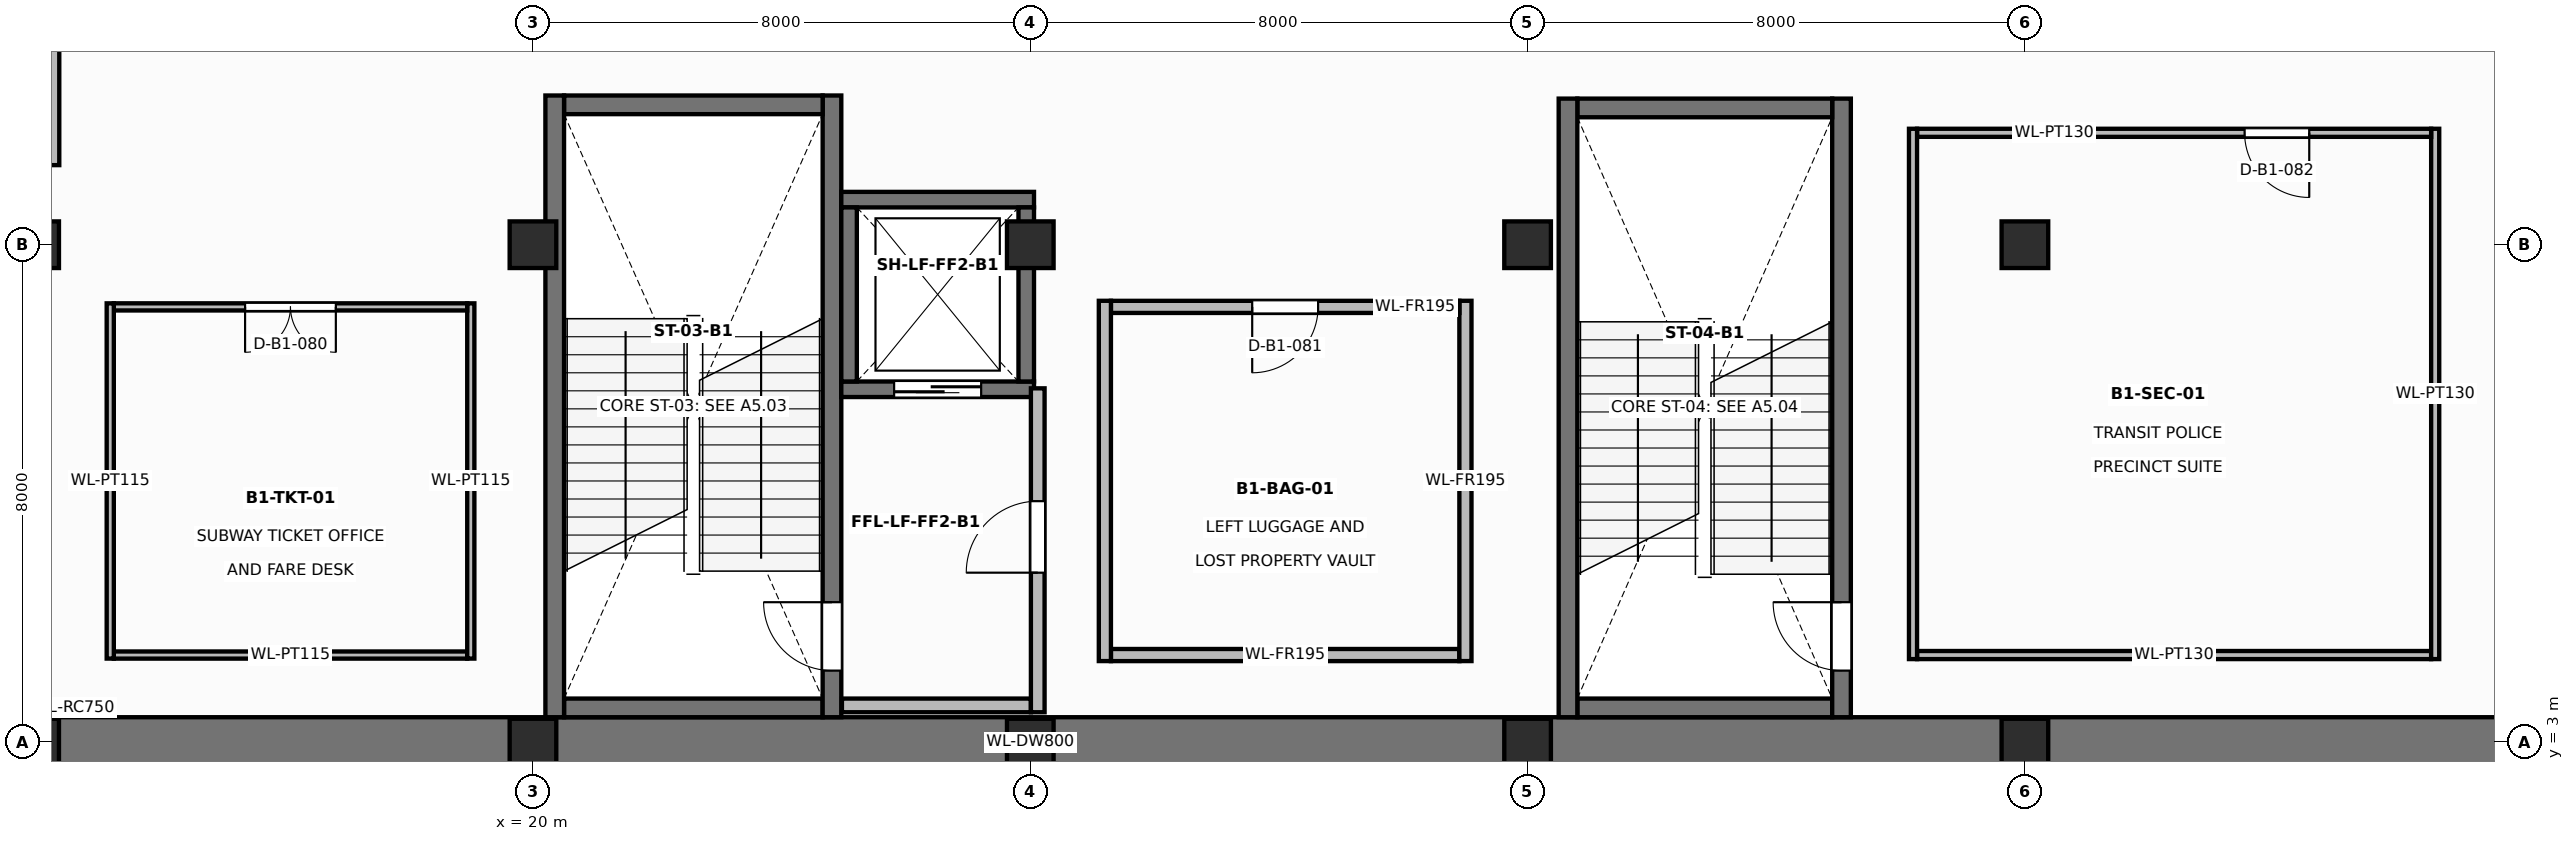
"""IFC4 building model, lengths in metres.
Left out: names, types, materials, properties, quantities, classifications, styles, units other than length and angle.
Written with IfcOpenShell. Run it as: python <this file> out.ifc"""

import sys

from ifc_helpers import new_model, si_unit, direction, frame, frame_2d, origin, origin_2d, place, context, subcontext, project, spatial, rectangle, extrude, element, fill, save


model = new_model("IFC4")
c1 = context("Model", 3, precision=1e-05, world=origin(), true_north=direction((0.0, 1.0)))
c2 = subcontext(c1, "Body", "Model", "MODEL_VIEW")
j1 = project(units=[si_unit("LENGTHUNIT", "METRE"), si_unit("PLANEANGLEUNIT", "RADIAN")], contexts=[c1])
p1 = place(None, origin())
s1 = spatial("IfcSite", under=j1, at=p1, CompositionType="ELEMENT")
p2 = place(p1, origin())
s2 = spatial("IfcBuilding", under=s1, at=p2, CompositionType="ELEMENT")
p3 = place(p2, frame((0.0, 0.0, -5.6)))
s3 = spatial("IfcBuildingStorey", under=s2, at=p3, CompositionType="ELEMENT", Elevation=-5.6)
p4 = place(p3, frame((4.4, 3.0, 0.0), z_axis=(0.0, 0.0, 1.0), x_axis=(1.0, 0.0, 0.0)))
e1 = element("IfcWall", 1, at=p4, inside=s3, PredefinedType="SOLIDWALL", context=c2, shape_type="SweptSolid", body=[
    extrude(rectangle(XDim=47.2, YDim=0.8, at=frame_2d((23.6, 0.0))), origin(), (0.0, 0.0, 1.0), 5.18),
])
for number, where, z_axis, x_axis in (
    (2, (12.0, 3.0, 0.0), (0.0, 0.0, 1.0), (1.0, 0.0, 0.0)),
    (3, (12.0, 11.0, 0.0), (0.0, 0.0, 1.0), (1.0, 0.0, 0.0)),
    (4, (20.0, 3.0, 0.0), (0.0, 0.0, 1.0), (1.0, 0.0, 0.0)),
    (5, (20.0, 11.0, 0.0), (0.0, 0.0, 1.0), (1.0, 0.0, 0.0)),
    (6, (28.0, 3.0, 0.0), (0.0, 0.0, 1.0), (1.0, 0.0, 0.0)),
    (7, (28.0, 11.0, 0.0), (0.0, 0.0, 1.0), (1.0, 0.0, 0.0)),
    (8, (36.0, 3.0, 0.0), (0.0, 0.0, 1.0), (1.0, 0.0, 0.0)),
    (9, (36.0, 11.0, 0.0), (0.0, 0.0, 1.0), (1.0, 0.0, 0.0)),
    (10, (44.0, 3.0, 0.0), (0.0, 0.0, 1.0), (1.0, 0.0, 0.0)),
    (11, (44.0, 11.0, 0.0), (0.0, 0.0, 1.0), (1.0, 0.0, 0.0)),
):
    element("IfcColumn", number, at=place(p3, frame(where, z_axis=z_axis, x_axis=x_axis)), inside=s3, PredefinedType="COLUMN", context=c2, shape_type="SweptSolid", body=[
        extrude(rectangle(XDim=0.75, YDim=0.75, at=origin_2d()), origin(), (0.0, 0.0, 1.0), 5.6),
    ])
p5 = place(p3, frame((20.5, 3.55, 0.0), z_axis=(0.0, 0.0, 1.0), x_axis=(1.0, 0.0, 0.0)))
e12 = element("IfcWall", 12, at=p5, inside=s3, PredefinedType="SHEAR", context=c2, shape_type="SweptSolid", body=[
    extrude(rectangle(XDim=4.16, YDim=0.3, at=frame_2d((2.08, 0.0))), origin(), (0.0, 0.0, 1.0), 5.275),
])
p6 = place(p3, frame((24.81, 3.4, 0.0), z_axis=(0.0, 0.0, 1.0), x_axis=(0.0, 1.0, 0.0)))
e13 = element("IfcWall", 13, at=p6, inside=s3, PredefinedType="SHEAR", context=c2, shape_type="SweptSolid", body=[
    extrude(rectangle(XDim=10.0, YDim=0.3, at=frame_2d((5.0, 0.0))), origin(), (0.0, 0.0, 1.0), 5.275),
])
p7 = place(p6, frame((0.75, 0.0, 0.0)))
e14 = element("IfcOpeningElement", 14, at=p7, cuts=e13, PredefinedType="OPENING", context=c2, shape_type="SweptSolid", body=[
    extrude(rectangle(XDim=1.1, YDim=2.15, at=frame_2d((0.55, 1.075))), frame((0.0, 0.16, 0.0), z_axis=(0.0, -1.0, 0.0), x_axis=(1.0, 0.0, 0.0)), (0.0, 0.0, 1.0), 0.32),
])
p8 = place(p3, frame((24.66, 13.25, 0.0), z_axis=(0.0, 0.0, 1.0), x_axis=(-1.0, 0.0, 0.0)))
e15 = element("IfcWall", 15, at=p8, inside=s3, PredefinedType="SHEAR", context=c2, shape_type="SweptSolid", body=[
    extrude(rectangle(XDim=4.16, YDim=0.3, at=frame_2d((2.08, 0.0))), origin(), (0.0, 0.0, 1.0), 5.275),
])
p9 = place(p3, frame((20.35, 13.4, 0.0), z_axis=(0.0, 0.0, 1.0), x_axis=(0.0, -1.0, 0.0)))
e16 = element("IfcWall", 16, at=p9, inside=s3, PredefinedType="SHEAR", context=c2, shape_type="SweptSolid", body=[
    extrude(rectangle(XDim=10.0, YDim=0.3, at=frame_2d((5.0, 0.0))), origin(), (0.0, 0.0, 1.0), 5.275),
])
p10 = place(p3, frame((36.8, 3.55, 0.0), z_axis=(0.0, 0.0, 1.0), x_axis=(1.0, 0.0, 0.0)))
e17 = element("IfcWall", 17, at=p10, inside=s3, PredefinedType="SHEAR", context=c2, shape_type="SweptSolid", body=[
    extrude(rectangle(XDim=4.1, YDim=0.3, at=frame_2d((2.05, 0.0))), origin(), (0.0, 0.0, 1.0), 5.275),
])
p11 = place(p3, frame((41.05, 3.4, 0.0), z_axis=(0.0, 0.0, 1.0), x_axis=(0.0, 1.0, 0.0)))
e18 = element("IfcWall", 18, at=p11, inside=s3, PredefinedType="SHEAR", context=c2, shape_type="SweptSolid", body=[
    extrude(rectangle(XDim=9.95, YDim=0.3, at=frame_2d((4.975, 0.0))), origin(), (0.0, 0.0, 1.0), 5.275),
])
p12 = place(p11, frame((0.75, 0.0, 0.0)))
e19 = element("IfcOpeningElement", 19, at=p12, cuts=e18, PredefinedType="OPENING", context=c2, shape_type="SweptSolid", body=[
    extrude(rectangle(XDim=1.1, YDim=2.15, at=frame_2d((0.55, 1.075))), frame((0.0, 0.16, 0.0), z_axis=(0.0, -1.0, 0.0), x_axis=(1.0, 0.0, 0.0)), (0.0, 0.0, 1.0), 0.32),
])
p13 = place(p3, frame((40.9, 13.2, 0.0), z_axis=(0.0, 0.0, 1.0), x_axis=(-1.0, 0.0, 0.0)))
e20 = element("IfcWall", 20, at=p13, inside=s3, PredefinedType="SHEAR", context=c2, shape_type="SweptSolid", body=[
    extrude(rectangle(XDim=4.1, YDim=0.3, at=frame_2d((2.05, 0.0))), origin(), (0.0, 0.0, 1.0), 5.275),
])
p14 = place(p3, frame((36.65, 13.35, 0.0), z_axis=(0.0, 0.0, 1.0), x_axis=(0.0, -1.0, 0.0)))
e21 = element("IfcWall", 21, at=p14, inside=s3, PredefinedType="SHEAR", context=c2, shape_type="SweptSolid", body=[
    extrude(rectangle(XDim=9.95, YDim=0.3, at=frame_2d((4.975, 0.0))), origin(), (0.0, 0.0, 1.0), 5.275),
])
p15 = place(p3, frame((12.27, 12.28, 0.0), z_axis=(0.0, 0.0, 1.0), x_axis=(0.0, 1.0, 0.0)))
e22 = element("IfcWall", 22, at=p15, inside=s3, PredefinedType="SOLIDWALL", context=c2, shape_type="SweptSolid", body=[
    extrude(rectangle(XDim=5.21, YDim=0.22, at=frame_2d((2.605, 0.0))), origin(), (0.0, 0.0, 1.0), 4.475),
])
p16 = place(p3, frame((24.96, 8.675, 0.0), z_axis=(0.0, 0.0, 1.0), x_axis=(1.0, 0.0, 0.0)))
e23 = element("IfcWall", 23, at=p16, inside=s3, PredefinedType="SOLIDWALL", context=c2, shape_type="SweptSolid", body=[
    extrude(rectangle(XDim=3.1, YDim=0.25, at=frame_2d((1.55, 0.0))), origin(), (0.0, 0.0, 1.0), 5.275),
])
p17 = place(p16, frame((0.85, 0.0, 0.0)))
e24 = element("IfcOpeningElement", 24, at=p17, cuts=e23, PredefinedType="OPENING", context=c2, shape_type="SweptSolid", body=[
    extrude(rectangle(XDim=1.4, YDim=2.25, at=frame_2d((0.7, 1.125))), frame((0.0, 0.135, 0.0), z_axis=(0.0, -1.0, 0.0), x_axis=(1.0, 0.0, 0.0)), (0.0, 0.0, 1.0), 0.27),
])
p18 = place(p3, frame((28.06, 11.725, 0.0), z_axis=(0.0, 0.0, 1.0), x_axis=(-1.0, 0.0, 0.0)))
e25 = element("IfcWall", 25, at=p18, inside=s3, PredefinedType="SOLIDWALL", context=c2, shape_type="SweptSolid", body=[
    extrude(rectangle(XDim=3.1, YDim=0.25, at=frame_2d((1.55, 0.0))), origin(), (0.0, 0.0, 1.0), 5.275),
])
for number, where, z_axis, x_axis in (
    (26, (27.935, 8.8, 0.0), (0.0, 0.0, 1.0), (0.0, 1.0, 0.0)),
    (27, (25.085, 11.6, 0.0), (0.0, 0.0, 1.0), (0.0, -1.0, 0.0)),
):
    element("IfcWall", number, at=place(p3, frame(where, z_axis=z_axis, x_axis=x_axis)), inside=s3, PredefinedType="SOLIDWALL", context=c2, shape_type="SweptSolid", body=[
        extrude(rectangle(XDim=2.8, YDim=0.25, at=frame_2d((1.4, 0.0))), origin(), (0.0, 0.0, 1.0), 5.275),
    ])
p19 = place(p3, frame((24.97, 3.59, 0.0), z_axis=(0.0, 0.0, 1.0), x_axis=(1.0, 0.0, 0.0)))
e28 = element("IfcWall", 28, at=p19, inside=s3, PredefinedType="SOLIDWALL", context=c2, shape_type="SweptSolid", body=[
    extrude(rectangle(XDim=3.04, YDim=0.22, at=frame_2d((1.52, 0.0))), origin(), (0.0, 0.0, 1.0), 4.475),
])
p20 = place(p3, frame((28.12, 3.48, 0.0), z_axis=(0.0, 0.0, 1.0), x_axis=(0.0, 1.0, 0.0)))
e29 = element("IfcWall", 29, at=p20, inside=s3, PredefinedType="SOLIDWALL", context=c2, shape_type="SweptSolid", body=[
    extrude(rectangle(XDim=5.21, YDim=0.22, at=frame_2d((2.605, 0.0))), origin(), (0.0, 0.0, 1.0), 4.475),
])
p21 = place(p20, frame((2.245, 0.0, 0.0)))
e30 = element("IfcOpeningElement", 30, at=p21, cuts=e29, PredefinedType="OPENING", context=c2, shape_type="SweptSolid", body=[
    extrude(rectangle(XDim=1.15, YDim=2.15, at=frame_2d((0.575, 1.075))), frame((0.0, 0.12, 0.0), z_axis=(0.0, -1.0, 0.0), x_axis=(1.0, 0.0, 0.0)), (0.0, 0.0, 1.0), 0.24),
])
p22 = place(p3, frame((13.257, 4.4, 0.0), z_axis=(0.0, 0.0, 1.0), x_axis=(1.0, 0.0, 0.0)))
e31 = element("IfcWall", 31, at=p22, inside=s3, PredefinedType="PARTITIONING", context=c2, shape_type="SweptSolid", body=[
    extrude(rectangle(XDim=5.685, YDim=0.115, at=frame_2d((2.842, 0.0))), origin(), (0.0, 0.0, 1.0), 5.18),
])
p23 = place(p3, frame((19.0, 4.343, 0.0), z_axis=(0.0, 0.0, 1.0), x_axis=(0.0, 1.0, 0.0)))
e32 = element("IfcWall", 32, at=p23, inside=s3, PredefinedType="PARTITIONING", context=c2, shape_type="SweptSolid", body=[
    extrude(rectangle(XDim=5.714, YDim=0.115, at=frame_2d((2.857, 0.0))), origin(), (0.0, 0.0, 1.0), 4.625),
])
p24 = place(p3, frame((18.942, 10.0, 0.0), z_axis=(0.0, 0.0, 1.0), x_axis=(-1.0, 0.0, 0.0)))
e33 = element("IfcWall", 33, at=p24, inside=s3, PredefinedType="PARTITIONING", context=c2, shape_type="SweptSolid", body=[
    extrude(rectangle(XDim=5.685, YDim=0.115, at=frame_2d((2.842, 0.0))), origin(), (0.0, 0.0, 1.0), 5.18),
])
p25 = place(p24, frame((2.113, 0.0, 0.0)))
e34 = element("IfcOpeningElement", 34, at=p25, cuts=e33, PredefinedType="OPENING", context=c2, shape_type="SweptSolid", body=[
    extrude(rectangle(XDim=1.46, YDim=2.2, at=frame_2d((0.73, 1.1))), frame((0.0, 0.067, 0.0), z_axis=(0.0, -1.0, 0.0), x_axis=(1.0, 0.0, 0.0)), (0.0, 0.0, 1.0), 0.135),
])
p26 = place(p3, frame((13.2, 10.057, 0.0), z_axis=(0.0, 0.0, 1.0), x_axis=(0.0, -1.0, 0.0)))
e35 = element("IfcWall", 35, at=p26, inside=s3, PredefinedType="PARTITIONING", context=c2, shape_type="SweptSolid", body=[
    extrude(rectangle(XDim=5.714, YDim=0.115, at=frame_2d((2.857, 0.0))), origin(), (0.0, 0.0, 1.0), 4.625),
])
p27 = place(p3, frame((29.297, 4.4, 0.0), z_axis=(0.0, 0.0, 1.0), x_axis=(1.0, 0.0, 0.0)))
e36 = element("IfcWall", 36, at=p27, inside=s3, PredefinedType="PARTITIONING", context=c2, shape_type="SweptSolid", body=[
    extrude(rectangle(XDim=5.606, YDim=0.195, at=frame_2d((2.803, 0.0))), origin(), (0.0, 0.0, 1.0), 5.18),
])
p28 = place(p3, frame((35.0, 4.303, 0.0), z_axis=(0.0, 0.0, 1.0), x_axis=(0.0, 1.0, 0.0)))
e37 = element("IfcWall", 37, at=p28, inside=s3, PredefinedType="PARTITIONING", context=c2, shape_type="SweptSolid", body=[
    extrude(rectangle(XDim=5.795, YDim=0.195, at=frame_2d((2.897, 0.0))), origin(), (0.0, 0.0, 1.0), 4.625),
])
p29 = place(p3, frame((34.903, 10.0, 0.0), z_axis=(0.0, 0.0, 1.0), x_axis=(-1.0, 0.0, 0.0)))
e38 = element("IfcWall", 38, at=p29, inside=s3, PredefinedType="PARTITIONING", context=c2, shape_type="SweptSolid", body=[
    extrude(rectangle(XDim=5.606, YDim=0.195, at=frame_2d((2.803, 0.0))), origin(), (0.0, 0.0, 1.0), 5.18),
])
p30 = place(p29, frame((2.273, 0.0, 0.0)))
e39 = element("IfcOpeningElement", 39, at=p30, cuts=e38, PredefinedType="OPENING", context=c2, shape_type="SweptSolid", body=[
    extrude(rectangle(XDim=1.06, YDim=2.16, at=frame_2d((0.53, 1.08))), frame((0.0, 0.107, 0.0), z_axis=(0.0, -1.0, 0.0), x_axis=(1.0, 0.0, 0.0)), (0.0, 0.0, 1.0), 0.215),
])
p31 = place(p3, frame((29.2, 10.098, 0.0), z_axis=(0.0, 0.0, 1.0), x_axis=(0.0, -1.0, 0.0)))
e40 = element("IfcWall", 40, at=p31, inside=s3, PredefinedType="PARTITIONING", context=c2, shape_type="SweptSolid", body=[
    extrude(rectangle(XDim=5.795, YDim=0.195, at=frame_2d((2.897, 0.0))), origin(), (0.0, 0.0, 1.0), 4.625),
])
p32 = place(p3, frame((42.265, 4.4, 0.0), z_axis=(0.0, 0.0, 1.0), x_axis=(1.0, 0.0, 0.0)))
e41 = element("IfcWall", 41, at=p32, inside=s3, PredefinedType="PARTITIONING", context=c2, shape_type="SweptSolid", body=[
    extrude(rectangle(XDim=8.27, YDim=0.13, at=frame_2d((4.135, 0.0))), origin(), (0.0, 0.0, 1.0), 4.475),
])
p33 = place(p3, frame((50.6, 4.335, 0.0), z_axis=(0.0, 0.0, 1.0), x_axis=(0.0, 1.0, 0.0)))
e42 = element("IfcWall", 42, at=p33, inside=s3, PredefinedType="PARTITIONING", context=c2, shape_type="SweptSolid", body=[
    extrude(rectangle(XDim=8.53, YDim=0.13, at=frame_2d((4.265, 0.0))), origin(), (0.0, 0.0, 1.0), 4.475),
])
p34 = place(p3, frame((50.535, 12.8, 0.0), z_axis=(0.0, 0.0, 1.0), x_axis=(-1.0, 0.0, 0.0)))
e43 = element("IfcWall", 43, at=p34, inside=s3, PredefinedType="PARTITIONING", context=c2, shape_type="SweptSolid", body=[
    extrude(rectangle(XDim=8.27, YDim=0.13, at=frame_2d((4.135, 0.0))), origin(), (0.0, 0.0, 1.0), 4.475),
])
p35 = place(p34, frame((1.961, 0.0, 0.0)))
e44 = element("IfcOpeningElement", 44, at=p35, cuts=e43, PredefinedType="OPENING", context=c2, shape_type="SweptSolid", body=[
    extrude(rectangle(XDim=1.04, YDim=2.16, at=frame_2d((0.52, 1.08))), frame((0.0, 0.075, 0.0), z_axis=(0.0, -1.0, 0.0), x_axis=(1.0, 0.0, 0.0)), (0.0, 0.0, 1.0), 0.15),
])
p36 = place(p3, frame((42.2, 12.865, 0.0), z_axis=(0.0, 0.0, 1.0), x_axis=(0.0, -1.0, 0.0)))
e45 = element("IfcWall", 45, at=p36, inside=s3, PredefinedType="PARTITIONING", context=c2, shape_type="SweptSolid", body=[
    extrude(rectangle(XDim=8.53, YDim=0.13, at=frame_2d((4.265, 0.0))), origin(), (0.0, 0.0, 1.0), 5.18),
])
p37 = place(p7, origin())
e46 = element("IfcDoor", 46, at=p37, inside=s3, OperationType="SINGLE_SWING_RIGHT", PredefinedType="DOOR", context=c2, shape_type="SweptSolid", body=[
    extrude(rectangle(XDim=1.1, YDim=2.15, at=frame_2d((0.55, 1.075))), frame((0.0, 0.025, 0.0), z_axis=(0.0, -1.0, 0.0), x_axis=(1.0, 0.0, 0.0)), (0.0, 0.0, 1.0), 0.05),
])
fill(e14, e46)
p38 = place(p12, origin())
e47 = element("IfcDoor", 47, at=p38, inside=s3, OperationType="SINGLE_SWING_RIGHT", PredefinedType="DOOR", context=c2, shape_type="SweptSolid", body=[
    extrude(rectangle(XDim=1.1, YDim=2.15, at=frame_2d((0.55, 1.075))), frame((0.0, 0.025, 0.0), z_axis=(0.0, -1.0, 0.0), x_axis=(1.0, 0.0, 0.0)), (0.0, 0.0, 1.0), 0.05),
])
fill(e19, e47)
p39 = place(p17, frame((1.4, 0.0, 0.0), z_axis=(0.0, 0.0, 1.0), x_axis=(-1.0, 0.0, 0.0)))
e48 = element("IfcDoor", 48, at=p39, inside=s3, OperationType="DOUBLE_DOOR_SLIDING", PredefinedType="DOOR", context=c2, shape_type="SweptSolid", body=[
    extrude(rectangle(XDim=1.4, YDim=2.25, at=frame_2d((0.7, 1.125))), frame((0.0, 0.025, 0.0), z_axis=(0.0, -1.0, 0.0), x_axis=(1.0, 0.0, 0.0)), (0.0, 0.0, 1.0), 0.05),
])
fill(e24, e48)
p40 = place(p21, origin())
e49 = element("IfcDoor", 49, at=p40, inside=s3, OperationType="SINGLE_SWING_LEFT", PredefinedType="DOOR", context=c2, shape_type="SweptSolid", body=[
    extrude(rectangle(XDim=1.15, YDim=2.15, at=frame_2d((0.575, 1.075))), frame((0.0, 0.025, 0.0), z_axis=(0.0, -1.0, 0.0), x_axis=(1.0, 0.0, 0.0)), (0.0, 0.0, 1.0), 0.05),
])
fill(e30, e49)
p41 = place(p25, origin())
e50 = element("IfcDoor", 50, at=p41, inside=s3, OperationType="DOUBLE_DOOR_SINGLE_SWING", PredefinedType="DOOR", context=c2, shape_type="SweptSolid", body=[
    extrude(rectangle(XDim=1.46, YDim=2.2, at=frame_2d((0.73, 1.1))), frame((0.0, 0.025, 0.0), z_axis=(0.0, -1.0, 0.0), x_axis=(1.0, 0.0, 0.0)), (0.0, 0.0, 1.0), 0.05),
])
fill(e34, e50)
p42 = place(p30, origin())
e51 = element("IfcDoor", 51, at=p42, inside=s3, OperationType="SINGLE_SWING_RIGHT", PredefinedType="DOOR", context=c2, shape_type="SweptSolid", body=[
    extrude(rectangle(XDim=1.06, YDim=2.16, at=frame_2d((0.53, 1.08))), frame((0.0, 0.025, 0.0), z_axis=(0.0, -1.0, 0.0), x_axis=(1.0, 0.0, 0.0)), (0.0, 0.0, 1.0), 0.05),
])
fill(e39, e51)
p43 = place(p35, origin())
e52 = element("IfcDoor", 52, at=p43, inside=s3, OperationType="SINGLE_SWING_LEFT", PredefinedType="DOOR", context=c2, shape_type="SweptSolid", body=[
    extrude(rectangle(XDim=1.04, YDim=2.16, at=frame_2d((0.52, 1.08))), frame((0.0, 0.025, 0.0), z_axis=(0.0, -1.0, 0.0), x_axis=(1.0, 0.0, 0.0)), (0.0, 0.0, 1.0), 0.05),
])
fill(e44, e52)
save(model, sys.argv[1])
